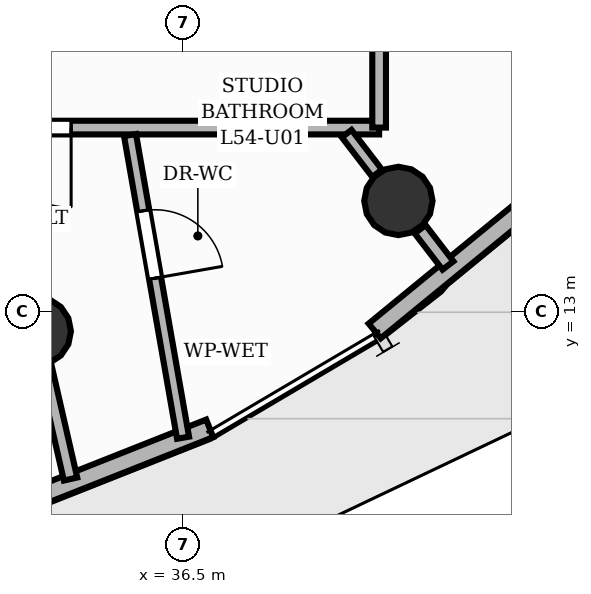
"""IFC4 building model, lengths in metres.
Left out: names, types, materials, properties, quantities, classifications, styles, units other than length and angle.
Written with IfcOpenShell. Run it as: python <this file> out.ifc"""

import sys

from ifc_helpers import new_model, si_unit, direction, frame, frame_2d, origin, origin_2d, place, context, subcontext, project, spatial, rectangle, circle, extrude, element, fill, save


model = new_model("IFC4")
c1 = context("Model", 3, precision=1e-05, world=origin(), true_north=direction((0.0, 1.0)))
c2 = subcontext(c1, "Body", "Model", "MODEL_VIEW")
j1 = project(units=[si_unit("LENGTHUNIT", "METRE"), si_unit("PLANEANGLEUNIT", "RADIAN")], contexts=[c1])
p1 = place(None, origin())
s1 = spatial("IfcSite", under=j1, at=p1, CompositionType="ELEMENT")
p2 = place(p1, origin())
s2 = spatial("IfcBuilding", under=s1, at=p2, CompositionType="ELEMENT")
p3 = place(p2, frame((0.0, 0.0, 182.24)))
s3 = spatial("IfcBuildingStorey", under=s2, at=p3, CompositionType="ELEMENT", Elevation=182.24)
for number, where, z_axis, x_axis in (
    (1, (34.575, 12.74, 0.0), (0.0, 0.0, 1.0), (1.0, 0.0, 0.0)),
    (2, (39.333, 14.455, 0.0), (0.0, 0.0, 1.0), (1.0, 0.0, 0.0)),
):
    element("IfcColumn", number, at=place(p3, frame(where, z_axis=z_axis, x_axis=x_axis)), inside=s3, PredefinedType="COLUMN", context=c2, shape_type="SweptSolid", body=[
        extrude(circle(Radius=0.45, at=origin_2d()), origin(), (0.0, 0.0, 1.0), 3.2),
    ])
p4 = place(p3, frame((36.851, 11.462, 0.0), z_axis=(0.0, 0.0, 1.0), x_axis=(-0.929693178164, -0.368334894459, 0.0)))
e3 = element("IfcWall", 3, at=p4, inside=s3, PredefinedType="SOLIDWALL", context=c2, shape_type="SweptSolid", body=[
    extrude(rectangle(XDim=2.702, YDim=0.25, at=frame_2d((1.351, 0.0))), origin(), (0.0, 0.0, 1.0), 2.96),
])
p5 = place(p3, frame((41.155, 14.492, 0.0), z_axis=(0.0, 0.0, 1.0), x_axis=(-0.773491700486, -0.633806428872, 0.0)))
e4 = element("IfcWall", 4, at=p5, inside=s3, PredefinedType="SOLIDWALL", context=c2, shape_type="SweptSolid", body=[
    extrude(rectangle(XDim=2.758, YDim=0.25, at=frame_2d((1.379, 0.0))), origin(), (0.0, 0.0, 1.0), 2.96),
])
p6 = place(p3, frame((34.68, 12.282, 0.0), z_axis=(0.0, 0.0, 1.0), x_axis=(0.222976920769, -0.974823723965, 0.0)))
e5 = element("IfcWall", 5, at=p6, inside=s3, PredefinedType="PARTITIONING", context=c2, shape_type="SweptSolid", body=[
    extrude(rectangle(XDim=1.525, YDim=0.18, at=frame_2d((0.763, 0.0))), origin(), (0.0, 0.0, 1.0), 2.403),
])
p7 = place(p3, frame((39.62, 14.082, 0.0), z_axis=(0.0, 0.0, 1.0), x_axis=(0.609062571598, -0.793122174623, 0.0)))
e6 = element("IfcWall", 6, at=p7, inside=s3, PredefinedType="PARTITIONING", context=c2, shape_type="SweptSolid", body=[
    extrude(rectangle(XDim=0.601, YDim=0.18, at=frame_2d((0.3, 0.0))), origin(), (0.0, 0.0, 1.0), 2.403),
])
p8 = place(p3, frame((39.08, 15.42, 0.0), z_axis=(0.0, 0.0, 1.0), x_axis=(-1.0, 0.0, 0.0)))
e7 = element("IfcWall", 7, at=p8, inside=s3, PredefinedType="PARTITIONING", context=c2, shape_type="SweptSolid", body=[
    extrude(rectangle(XDim=5.88, YDim=0.18, at=frame_2d((2.94, 0.0))), origin(), (0.0, 0.0, 1.0), 2.955),
])
p9 = place(p8, frame((4.052, 0.0, 0.0)))
e8 = element("IfcOpeningElement", 8, at=p9, cuts=e7, PredefinedType="OPENING", context=c2, shape_type="SweptSolid", body=[
    extrude(rectangle(XDim=1.05, YDim=2.15, at=frame_2d((0.525, 1.075))), frame((0.0, 0.1, 0.0), z_axis=(0.0, -1.0, 0.0), x_axis=(1.0, 0.0, 0.0)), (0.0, 0.0, 1.0), 0.2),
])
p10 = place(p3, frame((39.08, 28.156, 0.0), z_axis=(0.0, 0.0, 1.0), x_axis=(0.0, -1.0, 0.0)))
e9 = element("IfcWall", 9, at=p10, inside=s3, PredefinedType="PARTITIONING", context=c2, shape_type="SweptSolid", body=[
    extrude(rectangle(XDim=12.736, YDim=0.18, at=frame_2d((6.368, 0.0))), origin(), (0.0, 0.0, 1.0), 2.955),
])
p11 = place(p10, frame((4.269, 0.0, 0.0)))
e10 = element("IfcOpeningElement", 10, at=p11, cuts=e9, PredefinedType="OPENING", context=c2, shape_type="SweptSolid", body=[
    extrude(rectangle(XDim=1.05, YDim=2.15, at=frame_2d((0.525, 1.075))), frame((0.0, 0.1, 0.0), z_axis=(0.0, -1.0, 0.0), x_axis=(1.0, 0.0, 0.0)), (0.0, 0.0, 1.0), 0.2),
])
p12 = place(p3, frame((35.802, 15.322, 0.0), z_axis=(0.0, 0.0, 1.0), x_axis=(0.172579535558, -0.98499558573, 0.0)))
e11 = element("IfcWall", 11, at=p12, inside=s3, PredefinedType="PLUMBINGWALL", context=c2, shape_type="SweptSolid", body=[
    extrude(rectangle(XDim=4.043, YDim=0.16, at=frame_2d((2.021, 0.0))), origin(), (0.0, 0.0, 1.0), 2.692),
])
p13 = place(p12, frame((1.011, 0.0, 0.0)))
e12 = element("IfcOpeningElement", 12, at=p13, cuts=e11, PredefinedType="OPENING", context=c2, shape_type="SweptSolid", body=[
    extrude(rectangle(XDim=0.9, YDim=2.1, at=frame_2d((0.45, 1.05))), frame((0.0, 0.09, 0.0), z_axis=(0.0, -1.0, 0.0), x_axis=(1.0, 0.0, 0.0)), (0.0, 0.0, 1.0), 0.18),
])
p14 = place(p3, frame((38.653, 15.341, 0.0), z_axis=(0.0, 0.0, 1.0), x_axis=(0.609101063055, -0.79309261438, 0.0)))
e13 = element("IfcWall", 13, at=p14, inside=s3, PredefinedType="PLUMBINGWALL", context=c2, shape_type="SweptSolid", body=[
    extrude(rectangle(XDim=0.658, YDim=0.16, at=frame_2d((0.329, 0.0))), origin(), (0.0, 0.0, 1.0), 2.403),
])
p15 = place(p9, origin())
e14 = element("IfcDoor", 14, at=p15, inside=s3, OperationType="SINGLE_SWING_LEFT", PredefinedType="DOOR", context=c2, shape_type="SweptSolid", body=[
    extrude(rectangle(XDim=1.05, YDim=2.15, at=frame_2d((0.525, 1.075))), frame((0.0, 0.025, 0.0), z_axis=(0.0, -1.0, 0.0), x_axis=(1.0, 0.0, 0.0)), (0.0, 0.0, 1.0), 0.05),
])
fill(e8, e14)
p16 = place(p13, origin())
e15 = element("IfcDoor", 15, at=p16, inside=s3, OperationType="SINGLE_SWING_RIGHT", PredefinedType="DOOR", context=c2, shape_type="SweptSolid", body=[
    extrude(rectangle(XDim=0.9, YDim=2.1, at=frame_2d((0.45, 1.05))), frame((0.0, 0.025, 0.0), z_axis=(0.0, -1.0, 0.0), x_axis=(1.0, 0.0, 0.0)), (0.0, 0.0, 1.0), 0.05),
])
fill(e12, e15)
save(model, sys.argv[1])
